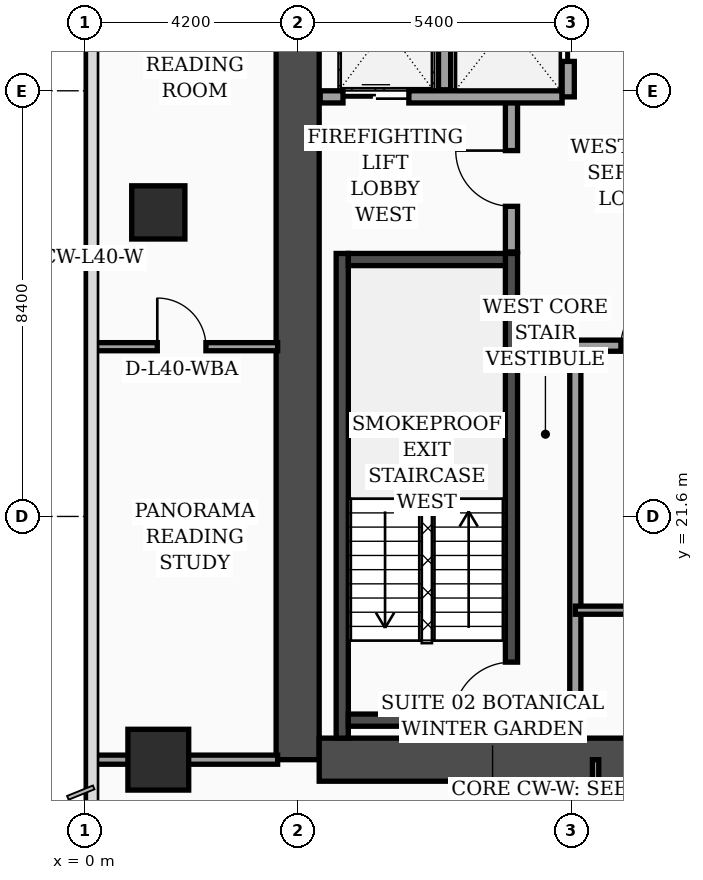
"""IFC4 building model, lengths in metres.
Left out: names, types, materials, properties, quantities, classifications, styles, units other than length and angle.
Written with IfcOpenShell. Run it as: python <this file> out.ifc"""

import sys

from ifc_helpers import new_model, si_unit, direction, frame, frame_2d, origin, origin_2d, place, context, subcontext, project, spatial, rectangle, extrude, element, fill, save


model = new_model("IFC4")
c1 = context("Model", 3, precision=1e-05, world=origin(), true_north=direction((0.0, 1.0)))
c2 = subcontext(c1, "Body", "Model", "MODEL_VIEW")
j1 = project(units=[si_unit("LENGTHUNIT", "METRE"), si_unit("PLANEANGLEUNIT", "RADIAN")], contexts=[c1])
p1 = place(None, origin())
s1 = spatial("IfcSite", under=j1, at=p1, CompositionType="ELEMENT")
p2 = place(p1, origin())
s2 = spatial("IfcBuilding", under=s1, at=p2, CompositionType="ELEMENT")
p3 = place(p2, frame((0.0, 0.0, 163.7)))
s3 = spatial("IfcBuildingStorey", under=s2, at=p3, CompositionType="ELEMENT", Elevation=163.7)
p4 = place(p3, frame((4.2, 16.8, 0.0), z_axis=(0.0, 0.0, 1.0), x_axis=(0.0, 1.0, 0.0)))
e1 = element("IfcWall", 1, at=p4, inside=s3, PredefinedType="SHEAR", context=c2, shape_type="SweptSolid", body=[
    extrude(rectangle(XDim=21.6, YDim=0.85, at=frame_2d((10.8, 0.0))), origin(), (0.0, 0.0, 1.0), 3.56),
])
p5 = place(p3, frame((4.625, 16.8, 0.0), z_axis=(0.0, 0.0, 1.0), x_axis=(1.0, 0.0, 0.0)))
e2 = element("IfcWall", 2, at=p5, inside=s3, PredefinedType="SHEAR", context=c2, shape_type="SweptSolid", body=[
    extrude(rectangle(XDim=9.95, YDim=0.85, at=frame_2d((4.975, 0.0))), origin(), (0.0, 0.0, 1.0), 3.56),
])
p6 = place(p3, frame((5.08, 17.225, 0.0), z_axis=(0.0, 0.0, 1.0), x_axis=(0.0, 1.0, 0.0)))
e3 = element("IfcWall", 3, at=p6, inside=s3, PredefinedType="SOLIDWALL", context=c2, shape_type="SweptSolid", body=[
    extrude(rectangle(XDim=9.565, YDim=0.24, at=frame_2d((4.782, 0.0))), origin(), (0.0, 0.0, 1.0), 3.56),
])
p7 = place(p3, frame((8.42, 17.225, 0.0), z_axis=(0.0, 0.0, 1.0), x_axis=(0.0, 1.0, 0.0)))
e4 = element("IfcWall", 4, at=p7, inside=s3, PredefinedType="SOLIDWALL", context=c2, shape_type="SweptSolid", body=[
    extrude(rectangle(XDim=9.565, YDim=0.24, at=frame_2d((4.782, 0.0))), origin(), (0.0, 0.0, 1.0), 3.56),
])
p8 = place(p7, frame((0.35, 0.0, 0.0)))
e5 = element("IfcOpeningElement", 5, at=p8, cuts=e4, PredefinedType="OPENING", context=c2, shape_type="SweptSolid", body=[
    extrude(rectangle(XDim=1.15, YDim=2.2, at=frame_2d((0.575, 1.1))), frame((0.0, 0.13, 0.0), z_axis=(0.0, -1.0, 0.0), x_axis=(1.0, 0.0, 0.0)), (0.0, 0.0, 1.0), 0.26),
])
for number, where, z_axis, x_axis in (
    (6, (5.2, 17.58, 0.0), (0.0, 0.0, 1.0), (1.0, 0.0, 0.0)),
    (7, (5.2, 26.67, 0.0), (0.0, 0.0, 1.0), (1.0, 0.0, 0.0)),
):
    element("IfcWall", number, at=place(p3, frame(where, z_axis=z_axis, x_axis=x_axis)), inside=s3, PredefinedType="SOLIDWALL", context=c2, shape_type="SweptSolid", body=[
        extrude(rectangle(XDim=3.1, YDim=0.24, at=frame_2d((1.55, 0.0))), origin(), (0.0, 0.0, 1.0), 3.56),
    ])
p9 = place(p3, frame((1.45, 16.8, 0.0), z_axis=(0.0, 0.0, 1.0), x_axis=(1.0, 0.0, 0.0)))
e8 = element("IfcColumn", 8, at=p9, inside=s3, PredefinedType="COLUMN", context=c2, shape_type="SweptSolid", body=[
    extrude(rectangle(XDim=1.2, YDim=1.2, at=origin_2d()), origin(), (0.0, 0.0, 1.0), 3.56),
])
p10 = place(p3, frame((1.45, 27.6, 0.0), z_axis=(0.0, 0.0, 1.0), x_axis=(1.0, 0.0, 0.0)))
e9 = element("IfcColumn", 9, at=p10, inside=s3, PredefinedType="COLUMN", context=c2, shape_type="SweptSolid", body=[
    extrude(rectangle(XDim=1.05, YDim=1.05, at=origin_2d()), origin(), (0.0, 0.0, 1.0), 3.56),
])
p11 = place(p3, frame((8.42, 26.82, 0.0), z_axis=(0.0, 0.0, 1.0), x_axis=(0.0, 1.0, 0.0)))
e10 = element("IfcWall", 10, at=p11, inside=s3, PredefinedType="SOLIDWALL", context=c2, shape_type="SweptSolid", body=[
    extrude(rectangle(XDim=3.0, YDim=0.24, at=frame_2d((1.5, 0.0))), origin(), (0.0, 0.0, 1.0), 3.56),
])
p12 = place(p11, frame((0.9, 0.0, 0.0)))
e11 = element("IfcOpeningElement", 11, at=p12, cuts=e10, PredefinedType="OPENING", context=c2, shape_type="SweptSolid", body=[
    extrude(rectangle(XDim=1.1, YDim=2.2, at=frame_2d((0.55, 1.1))), frame((0.0, 0.13, 0.0), z_axis=(0.0, -1.0, 0.0), x_axis=(1.0, 0.0, 0.0)), (0.0, 0.0, 1.0), 0.26),
])
p13 = place(p3, frame((4.645, 29.88, 0.0), z_axis=(0.0, 0.0, 1.0), x_axis=(1.0, 0.0, 0.0)))
e12 = element("IfcWall", 12, at=p13, inside=s3, PredefinedType="SOLIDWALL", context=c2, shape_type="SweptSolid", body=[
    extrude(rectangle(XDim=4.775, YDim=0.24, at=frame_2d((2.387, 0.0))), origin(), (0.0, 0.0, 1.0), 3.56),
])
p14 = place(p13, frame((0.45, 0.0, 0.0)))
e13 = element("IfcOpeningElement", 13, at=p14, cuts=e12, PredefinedType="OPENING", context=c2, shape_type="SweptSolid", body=[
    extrude(rectangle(XDim=1.3, YDim=2.35, at=frame_2d((0.65, 1.175))), frame((0.0, 0.13, 0.0), z_axis=(0.0, -1.0, 0.0), x_axis=(1.0, 0.0, 0.0)), (0.0, 0.0, 1.0), 0.26),
])
p15 = place(p3, frame((7.1, 30.02, 0.0), z_axis=(0.0, 0.0, 1.0), x_axis=(0.0, 1.0, 0.0)))
e14 = element("IfcWall", 14, at=p15, inside=s3, PredefinedType="SOLIDWALL", context=c2, shape_type="SweptSolid", body=[
    extrude(rectangle(XDim=2.63, YDim=0.24, at=frame_2d((1.315, 0.0))), origin(), (0.0, 0.0, 1.0), 3.56),
])
p16 = place(p3, frame((9.54, 29.88, 0.0), z_axis=(0.0, 0.0, 1.0), x_axis=(0.0, 1.0, 0.0)))
e15 = element("IfcWall", 15, at=p16, inside=s3, PredefinedType="SOLIDWALL", context=c2, shape_type="SweptSolid", body=[
    extrude(rectangle(XDim=2.9, YDim=0.24, at=frame_2d((1.45, 0.0))), origin(), (0.0, 0.0, 1.0), 3.56),
])
p17 = place(p16, frame((0.7, 0.0, 0.0)))
e16 = element("IfcOpeningElement", 16, at=p17, cuts=e15, PredefinedType="OPENING", context=c2, shape_type="SweptSolid", body=[
    extrude(rectangle(XDim=1.3, YDim=2.35, at=frame_2d((0.65, 1.175))), frame((0.0, 0.13, 0.0), z_axis=(0.0, -1.0, 0.0), x_axis=(1.0, 0.0, 0.0)), (0.0, 0.0, 1.0), 0.26),
])
p18 = place(p3, frame((9.68, 17.245, 0.0), z_axis=(0.0, 0.0, 1.0), x_axis=(0.0, 1.0, 0.0)))
e17 = element("IfcWall", 17, at=p18, inside=s3, PredefinedType="SOLIDWALL", context=c2, shape_type="SweptSolid", body=[
    extrude(rectangle(XDim=7.755, YDim=0.22, at=frame_2d((3.877, 0.0))), origin(), (0.0, 0.0, 1.0), 3.56),
])
p19 = place(p3, frame((9.68, 19.75, 0.0), z_axis=(0.0, 0.0, 1.0), x_axis=(1.0, 0.0, 0.0)))
e18 = element("IfcWall", 18, at=p19, inside=s3, PredefinedType="PARTITIONING", context=c2, shape_type="SweptSolid", body=[
    extrude(rectangle(XDim=4.875, YDim=0.16, at=frame_2d((2.438, 0.0))), origin(), (0.0, 0.0, 1.0), 3.56),
])
p20 = place(p19, frame((1.1, 0.0, 0.0)))
e19 = element("IfcOpeningElement", 19, at=p20, cuts=e18, PredefinedType="OPENING", context=c2, shape_type="SweptSolid", body=[
    extrude(rectangle(XDim=0.98, YDim=2.15, at=frame_2d((0.49, 1.075))), frame((0.0, 0.09, 0.0), z_axis=(0.0, -1.0, 0.0), x_axis=(1.0, 0.0, 0.0)), (0.0, 0.0, 1.0), 0.18),
])
p21 = place(p3, frame((9.68, 24.97, 0.0), z_axis=(0.0, 0.0, 1.0), x_axis=(1.0, 0.0, 0.0)))
e20 = element("IfcWall", 20, at=p21, inside=s3, PredefinedType="SOLIDWALL", context=c2, shape_type="SweptSolid", body=[
    extrude(rectangle(XDim=4.875, YDim=0.22, at=frame_2d((2.438, 0.0))), origin(), (0.0, 0.0, 1.0), 2.94),
])
p22 = place(p21, frame((0.9, 0.0, 0.0)))
e21 = element("IfcOpeningElement", 21, at=p22, cuts=e20, PredefinedType="OPENING", context=c2, shape_type="SweptSolid", body=[
    extrude(rectangle(XDim=0.98, YDim=2.15, at=frame_2d((0.49, 1.075))), frame((0.0, 0.12, 0.0), z_axis=(0.0, -1.0, 0.0), x_axis=(1.0, 0.0, 0.0)), (0.0, 0.0, 1.0), 0.24),
])
p23 = place(p3, frame((0.08, 24.95, 0.0), z_axis=(0.0, 0.0, 1.0), x_axis=(1.0, 0.0, 0.0)))
e22 = element("IfcWall", 22, at=p23, inside=s3, PredefinedType="PARTITIONING", context=c2, shape_type="SweptSolid", body=[
    extrude(rectangle(XDim=3.725, YDim=0.16, at=frame_2d((1.862, 0.0))), origin(), (0.0, 0.0, 1.0), 3.04),
])
p24 = place(p23, frame((1.35, 0.0, 0.0)))
e23 = element("IfcOpeningElement", 23, at=p24, cuts=e22, PredefinedType="OPENING", context=c2, shape_type="SweptSolid", body=[
    extrude(rectangle(XDim=0.96, YDim=2.2, at=frame_2d((0.48, 1.1))), frame((0.0, 0.09, 0.0), z_axis=(0.0, -1.0, 0.0), x_axis=(1.0, 0.0, 0.0)), (0.0, 0.0, 1.0), 0.18),
])
p25 = place(p3, frame((0.08, 16.8, 0.0), z_axis=(0.0, 0.0, 1.0), x_axis=(1.0, 0.0, 0.0)))
e24 = element("IfcWall", 24, at=p25, inside=s3, PredefinedType="PARTITIONING", context=c2, shape_type="SweptSolid", body=[
    extrude(rectangle(XDim=3.725, YDim=0.18, at=frame_2d((1.862, 0.0))), origin(), (0.0, 0.0, 1.0), 2.94),
])
p26 = place(p3, frame((10.08, 14.75, 0.0), z_axis=(0.0, 0.0, 1.0), x_axis=(0.0, 1.0, 0.0)))
e25 = element("IfcWall", 25, at=p26, inside=s3, PredefinedType="PARTITIONING", context=c2, shape_type="SweptSolid", body=[
    extrude(rectangle(XDim=2.05, YDim=0.125, at=frame_2d((1.025, 0.0))), origin(), (0.0, 0.0, 1.0), 3.56),
])
p27 = place(p12, origin())
e26 = element("IfcDoor", 26, at=p27, inside=s3, OperationType="SINGLE_SWING_RIGHT", PredefinedType="DOOR", context=c2, shape_type="SweptSolid", body=[
    extrude(rectangle(XDim=1.1, YDim=2.2, at=frame_2d((0.55, 1.1))), frame((0.0, 0.025, 0.0), z_axis=(0.0, -1.0, 0.0), x_axis=(1.0, 0.0, 0.0)), (0.0, 0.0, 1.0), 0.05),
])
fill(e11, e26)
p28 = place(p14, origin())
e27 = element("IfcDoor", 27, at=p28, inside=s3, OperationType="DOUBLE_DOOR_SLIDING", PredefinedType="DOOR", context=c2, shape_type="SweptSolid", body=[
    extrude(rectangle(XDim=1.3, YDim=2.35, at=frame_2d((0.65, 1.175))), frame((0.0, 0.025, 0.0), z_axis=(0.0, -1.0, 0.0), x_axis=(1.0, 0.0, 0.0)), (0.0, 0.0, 1.0), 0.05),
])
fill(e13, e27)
p29 = place(p17, origin())
e28 = element("IfcDoor", 28, at=p29, inside=s3, OperationType="DOUBLE_DOOR_SLIDING", PredefinedType="DOOR", context=c2, shape_type="SweptSolid", body=[
    extrude(rectangle(XDim=1.3, YDim=2.35, at=frame_2d((0.65, 1.175))), frame((0.0, 0.025, 0.0), z_axis=(0.0, -1.0, 0.0), x_axis=(1.0, 0.0, 0.0)), (0.0, 0.0, 1.0), 0.05),
])
fill(e16, e28)
p30 = place(p22, origin())
e29 = element("IfcDoor", 29, at=p30, inside=s3, OperationType="SINGLE_SWING_RIGHT", PredefinedType="DOOR", context=c2, shape_type="SweptSolid", body=[
    extrude(rectangle(XDim=0.98, YDim=2.15, at=frame_2d((0.49, 1.075))), frame((0.0, 0.025, 0.0), z_axis=(0.0, -1.0, 0.0), x_axis=(1.0, 0.0, 0.0)), (0.0, 0.0, 1.0), 0.05),
])
fill(e21, e29)
p31 = place(p24, origin())
e30 = element("IfcDoor", 30, at=p31, inside=s3, OperationType="SINGLE_SWING_LEFT", PredefinedType="DOOR", context=c2, shape_type="SweptSolid", body=[
    extrude(rectangle(XDim=0.96, YDim=2.2, at=frame_2d((0.48, 1.1))), frame((0.0, 0.025, 0.0), z_axis=(0.0, -1.0, 0.0), x_axis=(1.0, 0.0, 0.0)), (0.0, 0.0, 1.0), 0.05),
])
fill(e23, e30)
p32 = place(p8, origin())
e31 = element("IfcDoor", 31, at=p32, inside=s3, OperationType="SINGLE_SWING_LEFT", PredefinedType="DOOR", context=c2, shape_type="SweptSolid", body=[
    extrude(rectangle(XDim=1.15, YDim=2.2, at=frame_2d((0.575, 1.1))), frame((0.0, 0.025, 0.0), z_axis=(0.0, -1.0, 0.0), x_axis=(1.0, 0.0, 0.0)), (0.0, 0.0, 1.0), 0.05),
])
fill(e5, e31)
save(model, sys.argv[1])
